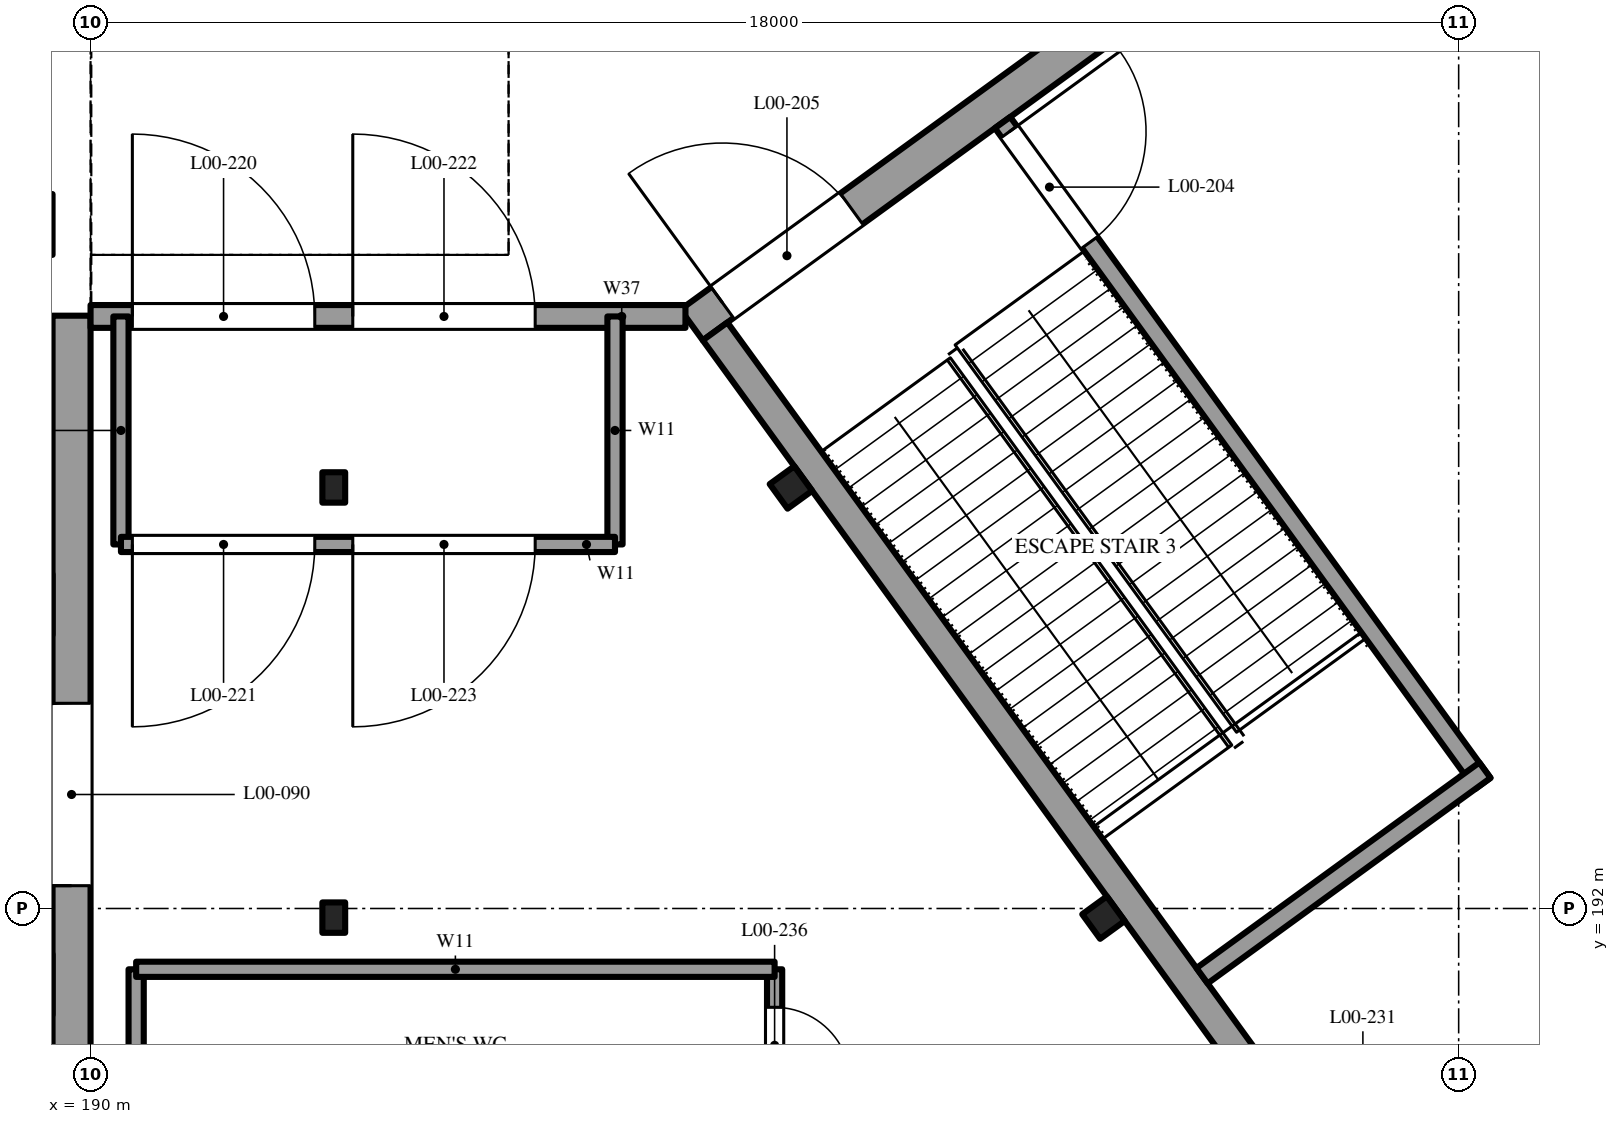
"""IFC4 building model, lengths in metres.
Left out: names, types, materials, properties, quantities, classifications, styles, units other than length and angle.
Written with IfcOpenShell. Run it as: python <this file> out.ifc"""

import sys

from ifc_helpers import new_model, si_unit, direction, frame, frame_2d, origin, origin_2d, place, context, subcontext, project, spatial, rectangle, i_section, extrude, element, fill, save


model = new_model("IFC4")
c1 = context("Model", 3, precision=1e-05, world=origin(), true_north=direction((0.0, 1.0)))
c2 = subcontext(c1, "Body", "Model", "MODEL_VIEW")
j1 = project(units=[si_unit("LENGTHUNIT", "METRE"), si_unit("PLANEANGLEUNIT", "RADIAN")], contexts=[c1])
p1 = place(None, origin())
s1 = spatial("IfcSite", under=j1, at=p1, CompositionType="ELEMENT")
p2 = place(p1, origin())
s2 = spatial("IfcBuilding", under=s1, at=p2, CompositionType="ELEMENT")
p3 = place(p2, origin())
s3 = spatial("IfcBuildingStorey", under=s2, at=p3, CompositionType="ELEMENT", Elevation=0.0)
p4 = place(p3, frame((197.908, 199.678, -0.3), z_axis=(0.0, 0.0, 1.0), x_axis=(0.809017930405, 0.587783963956, 0.0)))
e1 = element("IfcWall", 1, at=p4, inside=s3, PredefinedType="SOLIDWALL", context=c2, shape_type="SweptSolid", body=[
    extrude(rectangle(XDim=60.4, YDim=0.5, at=frame_2d((30.2, 0.0))), origin(), (0.0, 0.0, 1.0), 7.5),
])
p5 = place(p4, frame((41.2, 0.0, 0.3)))
e2 = element("IfcOpeningElement", 2, at=p5, cuts=e1, PredefinedType="OPENING", context=c2, shape_type="SweptSolid", body=[
    extrude(rectangle(XDim=2.4, YDim=2.4, at=frame_2d((1.2, 1.2))), frame((0.0, 0.26, 0.0), z_axis=(0.0, -1.0, 0.0), x_axis=(1.0, 0.0, 0.0)), (0.0, 0.0, 1.0), 0.52),
])
p6 = place(p4, frame((33.2, 0.0, 0.3)))
e3 = element("IfcOpeningElement", 3, at=p6, cuts=e1, PredefinedType="OPENING", context=c2, shape_type="SweptSolid", body=[
    extrude(rectangle(XDim=2.4, YDim=2.4, at=frame_2d((1.2, 1.2))), frame((0.0, 0.26, 0.0), z_axis=(0.0, -1.0, 0.0), x_axis=(1.0, 0.0, 0.0)), (0.0, 0.0, 1.0), 0.52),
])
p7 = place(p4, frame((0.5, 0.0, 0.3)))
e4 = element("IfcOpeningElement", 4, at=p7, cuts=e1, PredefinedType="OPENING", context=c2, shape_type="SweptSolid", body=[
    extrude(rectangle(XDim=2.1, YDim=2.1, at=frame_2d((1.05, 1.05))), frame((0.0, 0.26, 0.0), z_axis=(0.0, -1.0, 0.0), x_axis=(1.0, 0.0, 0.0)), (0.0, 0.0, 1.0), 0.52),
])
p8 = place(p4, frame((15.6, 0.0, 0.3)))
e5 = element("IfcOpeningElement", 5, at=p8, cuts=e1, PredefinedType="OPENING", context=c2, shape_type="SweptSolid", body=[
    extrude(rectangle(XDim=2.1, YDim=2.1, at=frame_2d((1.05, 1.05))), frame((0.0, 0.26, 0.0), z_axis=(0.0, -1.0, 0.0), x_axis=(1.0, 0.0, 0.0)), (0.0, 0.0, 1.0), 0.52),
])
p9 = place(p4, frame((50.75, 0.0, 2.4)))
e6 = element("IfcOpeningElement", 6, at=p9, cuts=e1, PredefinedType="OPENING", context=c2, shape_type="SweptSolid", body=[
    extrude(rectangle(XDim=1.2, YDim=1.2, at=frame_2d((0.6, 0.6))), frame((0.0, 0.26, 0.0), z_axis=(0.0, -1.0, 0.0), x_axis=(1.0, 0.0, 0.0)), (0.0, 0.0, 1.0), 0.52),
])
p10 = place(p4, frame((53.45, 0.0, 2.4)))
e7 = element("IfcOpeningElement", 7, at=p10, cuts=e1, PredefinedType="OPENING", context=c2, shape_type="SweptSolid", body=[
    extrude(rectangle(XDim=1.5, YDim=1.2, at=frame_2d((0.75, 0.6))), frame((0.0, 0.26, 0.0), z_axis=(0.0, -1.0, 0.0), x_axis=(1.0, 0.0, 0.0)), (0.0, 0.0, 1.0), 0.52),
])
p11 = place(p4, frame((57.35, 0.0, 2.4)))
e8 = element("IfcOpeningElement", 8, at=p11, cuts=e1, PredefinedType="OPENING", context=c2, shape_type="SweptSolid", body=[
    extrude(rectangle(XDim=1.5, YDim=1.2, at=frame_2d((0.75, 0.6))), frame((0.0, 0.26, 0.0), z_axis=(0.0, -1.0, 0.0), x_axis=(1.0, 0.0, 0.0)), (0.0, 0.0, 1.0), 0.52),
])
p12 = place(p3, frame((229.664, 156.311, -0.3), z_axis=(0.0, 0.0, 1.0), x_axis=(-0.587784977279, 0.809017194184, 0.0)))
e9 = element("IfcWall", 9, at=p12, inside=s3, PredefinedType="SOLIDWALL", context=c2, shape_type="SweptSolid", body=[
    extrude(rectangle(XDim=53.5, YDim=0.4, at=frame_2d((26.75, 0.0))), origin(), (0.0, 0.0, 1.0), 7.5),
])
p13 = place(p12, frame((13.3, 0.0, 0.3)))
e10 = element("IfcOpeningElement", 10, at=p13, cuts=e9, PredefinedType="OPENING", context=c2, shape_type="SweptSolid", body=[
    extrude(rectangle(XDim=2.4, YDim=2.4, at=frame_2d((1.2, 1.2))), frame((0.0, 0.21, 0.0), z_axis=(0.0, -1.0, 0.0), x_axis=(1.0, 0.0, 0.0)), (0.0, 0.0, 1.0), 0.42),
])
p14 = place(p12, frame((16.8, 0.0, 0.3)))
e11 = element("IfcOpeningElement", 11, at=p14, cuts=e9, PredefinedType="OPENING", context=c2, shape_type="SweptSolid", body=[
    extrude(rectangle(XDim=2.4, YDim=2.4, at=frame_2d((1.2, 1.2))), frame((0.0, 0.21, 0.0), z_axis=(0.0, -1.0, 0.0), x_axis=(1.0, 0.0, 0.0)), (0.0, 0.0, 1.0), 0.42),
])
p15 = place(p12, frame((20.3, 0.0, 0.3)))
e12 = element("IfcOpeningElement", 12, at=p15, cuts=e9, PredefinedType="OPENING", context=c2, shape_type="SweptSolid", body=[
    extrude(rectangle(XDim=2.4, YDim=2.4, at=frame_2d((1.2, 1.2))), frame((0.0, 0.21, 0.0), z_axis=(0.0, -1.0, 0.0), x_axis=(1.0, 0.0, 0.0)), (0.0, 0.0, 1.0), 0.42),
])
p16 = place(p12, frame((23.8, 0.0, 0.3)))
e13 = element("IfcOpeningElement", 13, at=p16, cuts=e9, PredefinedType="OPENING", context=c2, shape_type="SweptSolid", body=[
    extrude(rectangle(XDim=2.4, YDim=2.4, at=frame_2d((1.2, 1.2))), frame((0.0, 0.21, 0.0), z_axis=(0.0, -1.0, 0.0), x_axis=(1.0, 0.0, 0.0)), (0.0, 0.0, 1.0), 0.42),
])
p17 = place(p12, frame((27.3, 0.0, 0.3)))
e14 = element("IfcOpeningElement", 14, at=p17, cuts=e9, PredefinedType="OPENING", context=c2, shape_type="SweptSolid", body=[
    extrude(rectangle(XDim=2.4, YDim=2.4, at=frame_2d((1.2, 1.2))), frame((0.0, 0.21, 0.0), z_axis=(0.0, -1.0, 0.0), x_axis=(1.0, 0.0, 0.0)), (0.0, 0.0, 1.0), 0.42),
])
p18 = place(p12, frame((30.8, 0.0, 0.3)))
e15 = element("IfcOpeningElement", 15, at=p18, cuts=e9, PredefinedType="OPENING", context=c2, shape_type="SweptSolid", body=[
    extrude(rectangle(XDim=2.4, YDim=2.4, at=frame_2d((1.2, 1.2))), frame((0.0, 0.21, 0.0), z_axis=(0.0, -1.0, 0.0), x_axis=(1.0, 0.0, 0.0)), (0.0, 0.0, 1.0), 0.42),
])
p19 = place(p12, frame((34.3, 0.0, 0.3)))
e16 = element("IfcOpeningElement", 16, at=p19, cuts=e9, PredefinedType="OPENING", context=c2, shape_type="SweptSolid", body=[
    extrude(rectangle(XDim=2.4, YDim=2.4, at=frame_2d((1.2, 1.2))), frame((0.0, 0.21, 0.0), z_axis=(0.0, -1.0, 0.0), x_axis=(1.0, 0.0, 0.0)), (0.0, 0.0, 1.0), 0.42),
])
p20 = place(p12, frame((37.8, 0.0, 0.3)))
e17 = element("IfcOpeningElement", 17, at=p20, cuts=e9, PredefinedType="OPENING", context=c2, shape_type="SweptSolid", body=[
    extrude(rectangle(XDim=2.4, YDim=2.4, at=frame_2d((1.2, 1.2))), frame((0.0, 0.21, 0.0), z_axis=(0.0, -1.0, 0.0), x_axis=(1.0, 0.0, 0.0)), (0.0, 0.0, 1.0), 0.42),
])
p21 = place(p3, frame((193.2, 191.88, -0.3), z_axis=(0.0, 0.0, 1.0), x_axis=(1.0, 0.0, 0.0)))
e18 = element("IfcColumn", 18, at=p21, inside=s3, PredefinedType="COLUMN", context=c2, shape_type="SweptSolid", body=[
    extrude(i_section(OverallWidth=0.3, OverallDepth=0.4, WebThickness=0.013, FlangeThickness=0.024, FilletRadius=0.027, at=origin_2d()), origin(), (0.0, 0.0, 1.0), 7.5),
])
p22 = place(p3, frame((203.327, 191.88, -0.3), z_axis=(0.0, 0.0, 1.0), x_axis=(0.809016994375, 0.587785252292, 0.0)))
e19 = element("IfcColumn", 19, at=p22, inside=s3, PredefinedType="COLUMN", context=c2, shape_type="SweptSolid", body=[
    extrude(rectangle(XDim=0.4, YDim=0.4, at=origin_2d()), origin(), (0.0, 0.0, 1.0), 7.5),
])
p23 = place(p3, frame((193.2, 197.54, -0.3), z_axis=(0.0, 0.0, 1.0), x_axis=(1.0, 0.0, 0.0)))
e20 = element("IfcColumn", 20, at=p23, inside=s3, PredefinedType="COLUMN", context=c2, shape_type="SweptSolid", body=[
    extrude(i_section(OverallWidth=0.3, OverallDepth=0.4, WebThickness=0.013, FlangeThickness=0.024, FilletRadius=0.027, at=origin_2d()), origin(), (0.0, 0.0, 1.0), 7.5),
])
p24 = place(p3, frame((199.215, 197.54, -0.3), z_axis=(0.0, 0.0, 1.0), x_axis=(0.809016994375, 0.587785252292, 0.0)))
e21 = element("IfcColumn", 21, at=p24, inside=s3, PredefinedType="COLUMN", context=c2, shape_type="SweptSolid", body=[
    extrude(rectangle(XDim=0.4, YDim=0.4, at=origin_2d()), origin(), (0.0, 0.0, 1.0), 7.5),
])
p25 = place(p3, frame((189.75, 149.72, 0.0), z_axis=(0.0, 0.0, 1.0), x_axis=(0.0, 1.0, 0.0)))
e22 = element("IfcWall", 22, at=p25, inside=s3, PredefinedType="SOLIDWALL", context=c2, shape_type="SweptSolid", body=[
    extrude(rectangle(XDim=50.08, YDim=0.5, at=frame_2d((25.04, 0.0))), origin(), (0.0, 0.0, 1.0), 7.2),
])
p26 = place(p25, frame((7.58, 0.0, 0.0)))
e23 = element("IfcOpeningElement", 23, at=p26, cuts=e22, PredefinedType="OPENING", context=c2, shape_type="SweptSolid", body=[
    extrude(rectangle(XDim=2.4, YDim=2.4, at=frame_2d((1.2, 1.2))), frame((0.0, 0.26, 0.0), z_axis=(0.0, -1.0, 0.0), x_axis=(1.0, 0.0, 0.0)), (0.0, 0.0, 1.0), 0.52),
])
p27 = place(p25, frame((22.58, 0.0, 0.0)))
e24 = element("IfcOpeningElement", 24, at=p27, cuts=e22, PredefinedType="OPENING", context=c2, shape_type="SweptSolid", body=[
    extrude(rectangle(XDim=2.4, YDim=2.4, at=frame_2d((1.2, 1.2))), frame((0.0, 0.26, 0.0), z_axis=(0.0, -1.0, 0.0), x_axis=(1.0, 0.0, 0.0)), (0.0, 0.0, 1.0), 0.52),
])
p28 = place(p25, frame((42.58, 0.0, 0.0)))
e25 = element("IfcOpeningElement", 25, at=p28, cuts=e22, PredefinedType="OPENING", context=c2, shape_type="SweptSolid", body=[
    extrude(rectangle(XDim=2.4, YDim=2.4, at=frame_2d((1.2, 1.2))), frame((0.0, 0.26, 0.0), z_axis=(0.0, -1.0, 0.0), x_axis=(1.0, 0.0, 0.0)), (0.0, 0.0, 1.0), 0.52),
])
p29 = place(p3, frame((201.999, 202.342, 0.0), z_axis=(0.0, 0.0, 1.0), x_axis=(0.587775969834, -0.809023738395, 0.0)))
e26 = element("IfcWall", 26, at=p29, inside=s3, PredefinedType="SOLIDWALL", context=c2, shape_type="SweptSolid", body=[
    extrude(rectangle(XDim=10.75, YDim=0.25, at=frame_2d((5.375, 0.0))), origin(), (0.0, 0.0, 1.0), 7.2),
])
p30 = place(p29, frame((0.15, 0.0, 0.0)))
e27 = element("IfcOpeningElement", 27, at=p30, cuts=e26, PredefinedType="OPENING", context=c2, shape_type="SweptSolid", body=[
    extrude(rectangle(XDim=1.8, YDim=2.1, at=frame_2d((0.9, 1.05))), frame((0.0, 0.135, 0.0), z_axis=(0.0, -1.0, 0.0), x_axis=(1.0, 0.0, 0.0)), (0.0, 0.0, 1.0), 0.27),
])
p31 = place(p3, frame((204.624, 191.115, 0.0), z_axis=(0.0, 0.0, 1.0), x_axis=(0.809009113768, 0.587796098864, 0.0)))
e28 = element("IfcWall", 28, at=p31, inside=s3, PredefinedType="SOLIDWALL", context=c2, shape_type="SweptSolid", body=[
    extrude(rectangle(XDim=4.6, YDim=0.25, at=frame_2d((2.3, 0.0))), origin(), (0.0, 0.0, 1.0), 7.2),
])
p32 = place(p3, frame((190.0, 199.79, 0.0), z_axis=(0.0, 0.0, 1.0), x_axis=(1.0, 0.0, 0.0)))
e29 = element("IfcWall", 29, at=p32, inside=s3, PredefinedType="SOLIDWALL", context=c2, shape_type="SweptSolid", body=[
    extrude(rectangle(XDim=7.827, YDim=0.3, at=frame_2d((3.914, 0.0))), origin(), (0.0, 0.0, 1.0), 7.2),
])
p33 = place(p32, frame((0.55, 0.0, 0.0)))
e30 = element("IfcOpeningElement", 30, at=p33, cuts=e29, PredefinedType="OPENING", context=c2, shape_type="SweptSolid", body=[
    extrude(rectangle(XDim=2.4, YDim=2.4, at=frame_2d((1.2, 1.2))), frame((0.0, 0.16, 0.0), z_axis=(0.0, -1.0, 0.0), x_axis=(1.0, 0.0, 0.0)), (0.0, 0.0, 1.0), 0.32),
])
p34 = place(p32, frame((3.45, 0.0, 0.0)))
e31 = element("IfcOpeningElement", 31, at=p34, cuts=e29, PredefinedType="OPENING", context=c2, shape_type="SweptSolid", body=[
    extrude(rectangle(XDim=2.4, YDim=2.4, at=frame_2d((1.2, 1.2))), frame((0.0, 0.16, 0.0), z_axis=(0.0, -1.0, 0.0), x_axis=(1.0, 0.0, 0.0)), (0.0, 0.0, 1.0), 0.32),
])
for number, where, z_axis, x_axis in (
    (32, (190.4, 199.79, 0.0), (0.0, 0.0, 1.0), (0.0, -1.0, 0.0)),
    (33, (196.9, 199.79, 0.0), (0.0, 0.0, 1.0), (0.0, -1.0, 0.0)),
):
    element("IfcWall", number, at=place(p3, frame(where, z_axis=z_axis, x_axis=x_axis)), inside=s3, PredefinedType="SOLIDWALL", context=c2, shape_type="SweptSolid", body=[
        extrude(rectangle(XDim=3.0, YDim=0.2, at=frame_2d((1.5, 0.0))), origin(), (0.0, 0.0, 1.0), 3.2),
    ])
p35 = place(p3, frame((190.4, 196.79, 0.0), z_axis=(0.0, 0.0, 1.0), x_axis=(1.0, 0.0, 0.0)))
e34 = element("IfcWall", 34, at=p35, inside=s3, PredefinedType="SOLIDWALL", context=c2, shape_type="SweptSolid", body=[
    extrude(rectangle(XDim=6.5, YDim=0.2, at=frame_2d((3.25, 0.0))), origin(), (0.0, 0.0, 1.0), 3.2),
])
p36 = place(p35, frame((0.15, 0.0, 0.0)))
e35 = element("IfcOpeningElement", 35, at=p36, cuts=e34, PredefinedType="OPENING", context=c2, shape_type="SweptSolid", body=[
    extrude(rectangle(XDim=2.4, YDim=2.4, at=frame_2d((1.2, 1.2))), frame((0.0, 0.11, 0.0), z_axis=(0.0, -1.0, 0.0), x_axis=(1.0, 0.0, 0.0)), (0.0, 0.0, 1.0), 0.22),
])
p37 = place(p35, frame((3.05, 0.0, 0.0)))
e36 = element("IfcOpeningElement", 36, at=p37, cuts=e34, PredefinedType="OPENING", context=c2, shape_type="SweptSolid", body=[
    extrude(rectangle(XDim=2.4, YDim=2.4, at=frame_2d((1.2, 1.2))), frame((0.0, 0.11, 0.0), z_axis=(0.0, -1.0, 0.0), x_axis=(1.0, 0.0, 0.0)), (0.0, 0.0, 1.0), 0.22),
])
p38 = place(p3, frame((190.6, 184.3, 0.0), z_axis=(0.0, 0.0, 1.0), x_axis=(0.0, 1.0, 0.0)))
e37 = element("IfcWall", 37, at=p38, inside=s3, PredefinedType="SOLIDWALL", context=c2, shape_type="SweptSolid", body=[
    extrude(rectangle(XDim=6.9, YDim=0.2, at=frame_2d((3.45, 0.0))), origin(), (0.0, 0.0, 1.0), 3.2),
])
p39 = place(p3, frame((199.0, 184.3, 0.0), z_axis=(0.0, 0.0, 1.0), x_axis=(0.0, 1.0, 0.0)))
e38 = element("IfcWall", 38, at=p39, inside=s3, PredefinedType="SOLIDWALL", context=c2, shape_type="SweptSolid", body=[
    extrude(rectangle(XDim=6.9, YDim=0.2, at=frame_2d((3.45, 0.0))), origin(), (0.0, 0.0, 1.0), 3.2),
])
p40 = place(p39, frame((0.75, 0.0, 0.0)))
e39 = element("IfcOpeningElement", 39, at=p40, cuts=e38, PredefinedType="OPENING", context=c2, shape_type="SweptSolid", body=[
    extrude(rectangle(XDim=1.0, YDim=2.1, at=frame_2d((0.5, 1.05))), frame((0.0, 0.11, 0.0), z_axis=(0.0, -1.0, 0.0), x_axis=(1.0, 0.0, 0.0)), (0.0, 0.0, 1.0), 0.22),
])
p41 = place(p39, frame((3.2, 0.0, 0.0)))
e40 = element("IfcOpeningElement", 40, at=p41, cuts=e38, PredefinedType="OPENING", context=c2, shape_type="SweptSolid", body=[
    extrude(rectangle(XDim=1.0, YDim=2.1, at=frame_2d((0.5, 1.05))), frame((0.0, 0.11, 0.0), z_axis=(0.0, -1.0, 0.0), x_axis=(1.0, 0.0, 0.0)), (0.0, 0.0, 1.0), 0.22),
])
p42 = place(p39, frame((5.4, 0.0, 0.0)))
e41 = element("IfcOpeningElement", 41, at=p42, cuts=e38, PredefinedType="OPENING", context=c2, shape_type="SweptSolid", body=[
    extrude(rectangle(XDim=1.0, YDim=2.1, at=frame_2d((0.5, 1.05))), frame((0.0, 0.11, 0.0), z_axis=(0.0, -1.0, 0.0), x_axis=(1.0, 0.0, 0.0)), (0.0, 0.0, 1.0), 0.22),
])
p43 = place(p3, frame((190.6, 191.2, 0.0), z_axis=(0.0, 0.0, 1.0), x_axis=(1.0, 0.0, 0.0)))
e42 = element("IfcWall", 42, at=p43, inside=s3, PredefinedType="SOLIDWALL", context=c2, shape_type="SweptSolid", body=[
    extrude(rectangle(XDim=8.4, YDim=0.2, at=frame_2d((4.2, 0.0))), origin(), (0.0, 0.0, 1.0), 3.2),
])
p44 = place(p28, origin())
e43 = element("IfcDoor", 43, at=p44, inside=s3, OperationType="DOUBLE_DOOR_SINGLE_SWING", PredefinedType="DOOR", context=c2, shape_type="SweptSolid", body=[
    extrude(rectangle(XDim=2.4, YDim=2.4, at=frame_2d((1.2, 1.2))), frame((0.0, 0.025, 0.0), z_axis=(0.0, -1.0, 0.0), x_axis=(1.0, 0.0, 0.0)), (0.0, 0.0, 1.0), 0.05),
])
fill(e25, e43)
p45 = place(p30, origin())
e44 = element("IfcDoor", 44, at=p45, inside=s3, OperationType="DOUBLE_DOOR_SINGLE_SWING", PredefinedType="DOOR", context=c2, shape_type="SweptSolid", body=[
    extrude(rectangle(XDim=1.8, YDim=2.1, at=frame_2d((0.9, 1.05))), frame((0.0, 0.025, 0.0), z_axis=(0.0, -1.0, 0.0), x_axis=(1.0, 0.0, 0.0)), (0.0, 0.0, 1.0), 0.05),
])
fill(e27, e44)
p46 = place(p7, origin())
e45 = element("IfcDoor", 45, at=p46, inside=s3, OperationType="DOUBLE_DOOR_SINGLE_SWING", PredefinedType="DOOR", context=c2, shape_type="SweptSolid", body=[
    extrude(rectangle(XDim=2.1, YDim=2.1, at=frame_2d((1.05, 1.05))), frame((0.0, 0.025, 0.0), z_axis=(0.0, -1.0, 0.0), x_axis=(1.0, 0.0, 0.0)), (0.0, 0.0, 1.0), 0.05),
])
fill(e4, e45)
p47 = place(p33, origin())
e46 = element("IfcDoor", 46, at=p47, inside=s3, OperationType="DOUBLE_DOOR_SINGLE_SWING", PredefinedType="DOOR", context=c2, shape_type="SweptSolid", body=[
    extrude(rectangle(XDim=2.4, YDim=2.4, at=frame_2d((1.2, 1.2))), frame((0.0, 0.025, 0.0), z_axis=(0.0, -1.0, 0.0), x_axis=(1.0, 0.0, 0.0)), (0.0, 0.0, 1.0), 0.05),
])
fill(e30, e46)
p48 = place(p36, frame((2.4, 0.0, 0.0), z_axis=(0.0, 0.0, 1.0), x_axis=(-1.0, 0.0, 0.0)))
e47 = element("IfcDoor", 47, at=p48, inside=s3, OperationType="DOUBLE_DOOR_SINGLE_SWING", PredefinedType="DOOR", context=c2, shape_type="SweptSolid", body=[
    extrude(rectangle(XDim=2.4, YDim=2.4, at=frame_2d((1.2, 1.2))), frame((0.0, 0.025, 0.0), z_axis=(0.0, -1.0, 0.0), x_axis=(1.0, 0.0, 0.0)), (0.0, 0.0, 1.0), 0.05),
])
fill(e35, e47)
p49 = place(p34, origin())
e48 = element("IfcDoor", 48, at=p49, inside=s3, OperationType="DOUBLE_DOOR_SINGLE_SWING", PredefinedType="DOOR", context=c2, shape_type="SweptSolid", body=[
    extrude(rectangle(XDim=2.4, YDim=2.4, at=frame_2d((1.2, 1.2))), frame((0.0, 0.025, 0.0), z_axis=(0.0, -1.0, 0.0), x_axis=(1.0, 0.0, 0.0)), (0.0, 0.0, 1.0), 0.05),
])
fill(e31, e48)
p50 = place(p37, frame((2.4, 0.0, 0.0), z_axis=(0.0, 0.0, 1.0), x_axis=(-1.0, 0.0, 0.0)))
e49 = element("IfcDoor", 49, at=p50, inside=s3, OperationType="DOUBLE_DOOR_SINGLE_SWING", PredefinedType="DOOR", context=c2, shape_type="SweptSolid", body=[
    extrude(rectangle(XDim=2.4, YDim=2.4, at=frame_2d((1.2, 1.2))), frame((0.0, 0.025, 0.0), z_axis=(0.0, -1.0, 0.0), x_axis=(1.0, 0.0, 0.0)), (0.0, 0.0, 1.0), 0.05),
])
fill(e36, e49)
p51 = place(p42, frame((1.0, 0.0, 0.0), z_axis=(0.0, 0.0, 1.0), x_axis=(-1.0, 0.0, 0.0)))
e50 = element("IfcDoor", 50, at=p51, inside=s3, OperationType="SINGLE_SWING_RIGHT", PredefinedType="DOOR", context=c2, shape_type="SweptSolid", body=[
    extrude(rectangle(XDim=1.0, YDim=2.1, at=frame_2d((0.5, 1.05))), frame((0.0, 0.025, 0.0), z_axis=(0.0, -1.0, 0.0), x_axis=(1.0, 0.0, 0.0)), (0.0, 0.0, 1.0), 0.05),
])
fill(e41, e50)
save(model, sys.argv[1])
